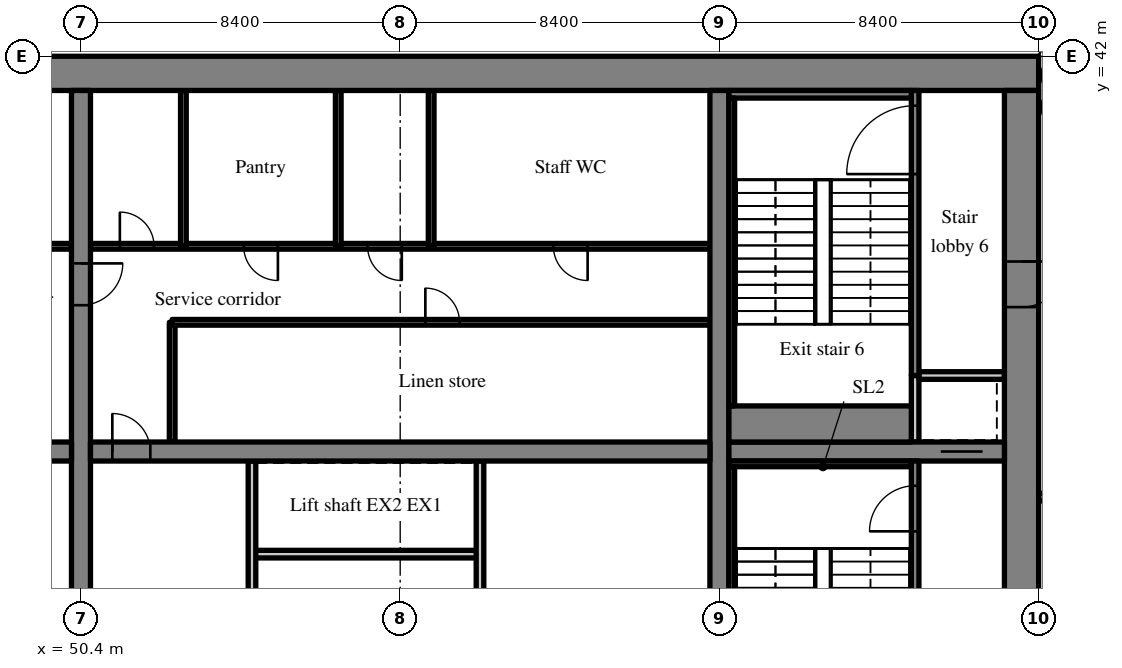
"""IFC4 building model, lengths in metres.
Left out: names, types, materials, properties, quantities, classifications, styles, units other than length and angle.
Written with IfcOpenShell. Run it as: python <this file> out.ifc"""

import sys

from ifc_helpers import new_model, si_unit, direction, frame, frame_2d, origin, place, context, subcontext, project, spatial, rectangle, extrude, source, transform, mapped, element, fill, save


model = new_model("IFC4")
c1 = context("Model", 3, precision=1e-05, world=origin(), true_north=direction((0.0, 1.0)))
c2 = subcontext(c1, "Body", "Model", "MODEL_VIEW")
j1 = project(units=[si_unit("LENGTHUNIT", "METRE"), si_unit("PLANEANGLEUNIT", "RADIAN")], contexts=[c1])
p1 = place(None, origin())
s1 = spatial("IfcSite", under=j1, at=p1, CompositionType="ELEMENT")
p2 = place(p1, origin())
s2 = spatial("IfcBuilding", under=s1, at=p2, CompositionType="ELEMENT")
p3 = place(p2, frame((0.0, 0.0, 102.8)))
s3 = spatial("IfcBuildingStorey", under=s2, at=p3, CompositionType="ELEMENT", Elevation=102.8)
m1 = source(origin(), c2, "Body", "SweptSolid", [
    extrude(rectangle(XDim=50.4, YDim=0.9, at=frame_2d((25.2, 0.0))), origin(), (0.0, 0.0, 1.0), 3.52),
])
p4 = place(p3, frame((25.2, 41.55, 0.0), z_axis=(0.0, 0.0, 1.0), x_axis=(1.0, 0.0, 0.0)))
e1 = element("IfcWall", 1, at=p4, inside=s3, PredefinedType="SHEAR", context=c2, shape_type="MappedRepresentation", body=[
    mapped(m1, transform((0.0, 0.0, 0.0), scale=1.0)),
])
m2 = source(origin(), c2, "Body", "SweptSolid", [
    extrude(rectangle(XDim=18.2, YDim=0.9, at=frame_2d((9.1, 0.0))), origin(), (0.0, 0.0, 1.0), 3.52),
])
p5 = place(p3, frame((75.15, 22.9, 0.0), z_axis=(0.0, 0.0, 1.0), x_axis=(0.0, 1.0, 0.0)))
e2 = element("IfcWall", 2, at=p5, inside=s3, PredefinedType="SHEAR", context=c2, shape_type="MappedRepresentation", body=[
    mapped(m2, transform((0.0, 0.0, 0.0), scale=1.0)),
])
m3 = source(origin(), c2, "Body", "SweptSolid", [
    extrude(rectangle(XDim=1.2, YDim=2.1, at=frame_2d((0.6, 1.05))), frame((0.0, 0.46, 0.0), z_axis=(0.0, -1.0, 0.0), x_axis=(1.0, 0.0, 0.0)), (0.0, 0.0, 1.0), 0.92),
])
p6 = place(p5, frame((12.5, 0.0, 0.0)))
e3 = element("IfcOpeningElement", 3, at=p6, cuts=e2, PredefinedType="OPENING", context=c2, shape_type="MappedRepresentation", body=[
    mapped(m3, transform((0.0, 0.0, 0.0), scale=1.0)),
])
m4 = source(origin(), c2, "Body", "SweptSolid", [
    extrude(rectangle(XDim=18.2, YDim=0.5, at=frame_2d((9.1, 0.0))), origin(), (0.0, 0.0, 1.0), 3.52),
])
p7 = place(p3, frame((50.4, 22.9, 0.0), z_axis=(0.0, 0.0, 1.0), x_axis=(0.0, 1.0, 0.0)))
e4 = element("IfcWall", 4, at=p7, inside=s3, PredefinedType="SHEAR", context=c2, shape_type="MappedRepresentation", body=[
    mapped(m4, transform((0.0, 0.0, 0.0), scale=1.0)),
])
m5 = source(origin(), c2, "Body", "SweptSolid", [
    extrude(rectangle(XDim=1.1, YDim=2.1, at=frame_2d((0.55, 1.05))), frame((0.0, 0.26, 0.0), z_axis=(0.0, -1.0, 0.0), x_axis=(1.0, 0.0, 0.0)), (0.0, 0.0, 1.0), 0.52),
])
p8 = place(p7, frame((12.55, 0.0, 0.0)))
e5 = element("IfcOpeningElement", 5, at=p8, cuts=e4, PredefinedType="OPENING", context=c2, shape_type="MappedRepresentation", body=[
    mapped(m5, transform((0.0, 0.0, 0.0), scale=1.0)),
])
p9 = place(p3, frame((67.2, 22.9, 0.0), z_axis=(0.0, 0.0, 1.0), x_axis=(0.0, 1.0, 0.0)))
e6 = element("IfcWall", 6, at=p9, inside=s3, PredefinedType="SHEAR", context=c2, shape_type="MappedRepresentation", body=[
    mapped(m4, transform((0.0, 0.0, 0.0), scale=1.0)),
])
m6 = source(origin(), c2, "Body", "SweptSolid", [
    extrude(rectangle(XDim=16.3, YDim=0.5, at=frame_2d((8.15, 0.0))), origin(), (0.0, 0.0, 1.0), 3.52),
])
p10 = place(p3, frame((33.85, 31.6, 0.0), z_axis=(0.0, 0.0, 1.0), x_axis=(1.0, 0.0, 0.0)))
e7 = element("IfcWall", 7, at=p10, inside=s3, PredefinedType="SHEAR", context=c2, shape_type="MappedRepresentation", body=[
    mapped(m6, transform((0.0, 0.0, 0.0), scale=1.0)),
])
m7 = source(origin(), c2, "Body", "SweptSolid", [
    extrude(rectangle(XDim=1.0, YDim=2.1, at=frame_2d((0.5, 1.05))), frame((0.0, 0.26, 0.0), z_axis=(0.0, -1.0, 0.0), x_axis=(1.0, 0.0, 0.0)), (0.0, 0.0, 1.0), 0.52),
])
p11 = place(p10, frame((14.725, 0.0, 0.0)))
e8 = element("IfcOpeningElement", 8, at=p11, cuts=e7, PredefinedType="OPENING", context=c2, shape_type="MappedRepresentation", body=[
    mapped(m7, transform((0.0, 0.0, 0.0), scale=1.0)),
])
m8 = source(origin(), c2, "Body", "SweptSolid", [
    extrude(rectangle(XDim=16.3, YDim=0.5, at=frame_2d((8.15, 0.0))), origin(), (0.0, 0.0, 1.0), 3.52),
])
p12 = place(p3, frame((50.65, 31.6, 0.0), z_axis=(0.0, 0.0, 1.0), x_axis=(1.0, 0.0, 0.0)))
e9 = element("IfcWall", 9, at=p12, inside=s3, PredefinedType="SHEAR", context=c2, shape_type="MappedRepresentation", body=[
    mapped(m8, transform((0.0, 0.0, 0.0), scale=1.0)),
])
p13 = place(p12, frame((0.575, 0.0, 0.0)))
e10 = element("IfcOpeningElement", 10, at=p13, cuts=e9, PredefinedType="OPENING", context=c2, shape_type="MappedRepresentation", body=[
    mapped(m7, transform((0.0, 0.0, 0.0), scale=1.0)),
])
m9 = source(origin(), c2, "Body", "SweptSolid", [
    extrude(rectangle(XDim=7.25, YDim=0.5, at=frame_2d((3.625, 0.0))), origin(), (0.0, 0.0, 1.0), 3.52),
])
p14 = place(p3, frame((67.45, 31.6, 0.0), z_axis=(0.0, 0.0, 1.0), x_axis=(1.0, 0.0, 0.0)))
e11 = element("IfcWall", 11, at=p14, inside=s3, PredefinedType="SHEAR", context=c2, shape_type="MappedRepresentation", body=[
    mapped(m9, transform((0.0, 0.0, 0.0), scale=1.0)),
])
p15 = place(p14, frame((5.575, 0.0, 0.0)))
e12 = element("IfcOpeningElement", 12, at=p15, cuts=e11, PredefinedType="OPENING", context=c2, shape_type="MappedRepresentation", body=[
    mapped(m5, transform((0.0, 0.0, 0.0), scale=1.0)),
])
m10 = source(origin(), c2, "Body", "SweptSolid", [
    extrude(rectangle(XDim=3.559, YDim=0.3, at=frame_2d((1.78, 0.0))), origin(), (0.0, 0.0, 1.0), 3.52),
])
p16 = place(p3, frame((76.523, 43.292, 0.0), z_axis=(0.0, 0.0, 1.0), x_axis=(-0.35779745313, -0.933799219604, 0.0)))
e13 = element("IfcWall", 13, at=p16, inside=s3, PredefinedType="SOLIDWALL", context=c2, shape_type="MappedRepresentation", body=[
    mapped(m10, transform((0.0, 0.0, 0.0), scale=1.0)),
])
m11 = source(origin(), c2, "Body", "SweptSolid", [
    extrude(rectangle(XDim=1.5, YDim=2.0, at=frame_2d((0.75, 1.0))), frame((0.0, 0.16, 0.0), z_axis=(0.0, -1.0, 0.0), x_axis=(1.0, 0.0, 0.0)), (0.0, 0.0, 1.0), 0.32),
])
p17 = place(p16, frame((0.156, 0.0, 0.9)))
e14 = element("IfcOpeningElement", 14, at=p17, cuts=e13, PredefinedType="OPENING", context=c2, shape_type="MappedRepresentation", body=[
    mapped(m11, transform((0.0, 0.0, 0.0), scale=1.0)),
])
m12 = source(origin(), c2, "Body", "SweptSolid", [
    extrude(rectangle(XDim=16.3, YDim=0.15, at=frame_2d((8.15, 0.0))), origin(), (0.0, 0.0, 1.0), 3.52),
])
p18 = place(p3, frame((33.85, 37.0, 0.0), z_axis=(0.0, 0.0, 1.0), x_axis=(1.0, 0.0, 0.0)))
e15 = element("IfcWall", 15, at=p18, inside=s3, PredefinedType="PARTITIONING", context=c2, shape_type="MappedRepresentation", body=[
    mapped(m12, transform((0.0, 0.0, 0.0), scale=1.0)),
])
m13 = source(origin(), c2, "Body", "SweptSolid", [
    extrude(rectangle(XDim=0.9, YDim=2.1, at=frame_2d((0.45, 1.05))), frame((0.0, 0.085, 0.0), z_axis=(0.0, -1.0, 0.0), x_axis=(1.0, 0.0, 0.0)), (0.0, 0.0, 1.0), 0.17),
])
p19 = place(p18, frame((1.588, 0.0, 0.0)))
e16 = element("IfcOpeningElement", 16, at=p19, cuts=e15, PredefinedType="OPENING", context=c2, shape_type="MappedRepresentation", body=[
    mapped(m13, transform((0.0, 0.0, 0.0), scale=1.0)),
])
p20 = place(p18, frame((7.293, 0.0, 0.0)))
e17 = element("IfcOpeningElement", 17, at=p20, cuts=e15, PredefinedType="OPENING", context=c2, shape_type="MappedRepresentation", body=[
    mapped(m13, transform((0.0, 0.0, 0.0), scale=1.0)),
])
p21 = place(p18, frame((12.183, 0.0, 0.0)))
e18 = element("IfcOpeningElement", 18, at=p21, cuts=e15, PredefinedType="OPENING", context=c2, shape_type="MappedRepresentation", body=[
    mapped(m13, transform((0.0, 0.0, 0.0), scale=1.0)),
])
p22 = place(p18, frame((14.627, 0.0, 0.0)))
e19 = element("IfcOpeningElement", 19, at=p22, cuts=e15, PredefinedType="OPENING", context=c2, shape_type="MappedRepresentation", body=[
    mapped(m13, transform((0.0, 0.0, 0.0), scale=1.0)),
])
m14 = source(origin(), c2, "Body", "SweptSolid", [
    extrude(rectangle(XDim=6.0, YDim=0.2, at=frame_2d((3.0, 0.0))), origin(), (0.0, 0.0, 1.0), 3.52),
])
p23 = place(p3, frame((60.9, 28.9, 0.0), z_axis=(0.0, 0.0, 1.0), x_axis=(-1.0, 0.0, 0.0)))
e20 = element("IfcWall", 20, at=p23, inside=s3, PredefinedType="SOLIDWALL", context=c2, shape_type="MappedRepresentation", body=[
    mapped(m14, transform((0.0, 0.0, 0.0), scale=1.0)),
])
m15 = source(origin(), c2, "Body", "SweptSolid", [
    extrude(rectangle(XDim=8.45, YDim=0.2, at=frame_2d((4.225, 0.0))), origin(), (0.0, 0.0, 1.0), 3.52),
])
for number, where, z_axis, x_axis in (
    (21, (54.9, 22.9, 0.0), (0.0, 0.0, 1.0), (0.0, 1.0, 0.0)),
    (22, (60.9, 22.9, 0.0), (0.0, 0.0, 1.0), (0.0, 1.0, 0.0)),
):
    element("IfcWall", number, at=place(p3, frame(where, z_axis=z_axis, x_axis=x_axis)), inside=s3, PredefinedType="PARTITIONING", context=c2, shape_type="MappedRepresentation", body=[
        mapped(m15, transform((0.0, 0.0, 0.0), scale=1.0)),
    ])
m16 = source(origin(), c2, "Body", "SweptSolid", [
    extrude(rectangle(XDim=3.15, YDim=0.15, at=frame_2d((1.575, 0.0))), origin(), (0.0, 0.0, 1.0), 3.52),
])
p24 = place(p3, frame((52.8, 31.85, 0.0), z_axis=(0.0, 0.0, 1.0), x_axis=(0.0, 1.0, 0.0)))
e23 = element("IfcWall", 23, at=p24, inside=s3, PredefinedType="PARTITIONING", context=c2, shape_type="MappedRepresentation", body=[
    mapped(m16, transform((0.0, 0.0, 0.0), scale=1.0)),
])
m17 = source(origin(), c2, "Body", "SweptSolid", [
    extrude(rectangle(XDim=14.15, YDim=0.15, at=frame_2d((7.075, 0.0))), origin(), (0.0, 0.0, 1.0), 3.52),
])
p25 = place(p3, frame((66.95, 35.0, 0.0), z_axis=(0.0, 0.0, 1.0), x_axis=(-1.0, 0.0, 0.0)))
e24 = element("IfcWall", 24, at=p25, inside=s3, PredefinedType="PARTITIONING", context=c2, shape_type="MappedRepresentation", body=[
    mapped(m17, transform((0.0, 0.0, 0.0), scale=1.0)),
])
p26 = place(p25, frame((6.588, 0.0, 0.0)))
e25 = element("IfcOpeningElement", 25, at=p26, cuts=e24, PredefinedType="OPENING", context=c2, shape_type="MappedRepresentation", body=[
    mapped(m13, transform((0.0, 0.0, 0.0), scale=1.0)),
])
m18 = source(origin(), c2, "Body", "SweptSolid", [
    extrude(rectangle(XDim=16.3, YDim=0.15, at=frame_2d((8.15, 0.0))), origin(), (0.0, 0.0, 1.0), 3.52),
])
p27 = place(p3, frame((66.95, 37.0, 0.0), z_axis=(0.0, 0.0, 1.0), x_axis=(-1.0, 0.0, 0.0)))
e26 = element("IfcWall", 26, at=p27, inside=s3, PredefinedType="PARTITIONING", context=c2, shape_type="MappedRepresentation", body=[
    mapped(m18, transform((0.0, 0.0, 0.0), scale=1.0)),
])
p28 = place(p27, frame((3.218, 0.0, 0.0)))
e27 = element("IfcOpeningElement", 27, at=p28, cuts=e26, PredefinedType="OPENING", context=c2, shape_type="MappedRepresentation", body=[
    mapped(m13, transform((0.0, 0.0, 0.0), scale=1.0)),
])
p29 = place(p27, frame((8.108, 0.0, 0.0)))
e28 = element("IfcOpeningElement", 28, at=p29, cuts=e26, PredefinedType="OPENING", context=c2, shape_type="MappedRepresentation", body=[
    mapped(m13, transform((0.0, 0.0, 0.0), scale=1.0)),
])
p30 = place(p27, frame((11.368, 0.0, 0.0)))
e29 = element("IfcOpeningElement", 29, at=p30, cuts=e26, PredefinedType="OPENING", context=c2, shape_type="MappedRepresentation", body=[
    mapped(m13, transform((0.0, 0.0, 0.0), scale=1.0)),
])
p31 = place(p27, frame((14.627, 0.0, 0.0)))
e30 = element("IfcOpeningElement", 30, at=p31, cuts=e26, PredefinedType="OPENING", context=c2, shape_type="MappedRepresentation", body=[
    mapped(m13, transform((0.0, 0.0, 0.0), scale=1.0)),
])
m19 = source(origin(), c2, "Body", "SweptSolid", [
    extrude(rectangle(XDim=4.1, YDim=0.15, at=frame_2d((2.05, 0.0))), origin(), (0.0, 0.0, 1.0), 3.52),
])
for number, where, z_axis, x_axis in (
    (31, (59.615, 37.0, 0.0), (0.0, 0.0, 1.0), (0.0, 1.0, 0.0)),
    (32, (57.17, 37.0, 0.0), (0.0, 0.0, 1.0), (0.0, 1.0, 0.0)),
    (33, (53.095, 37.0, 0.0), (0.0, 0.0, 1.0), (0.0, 1.0, 0.0)),
):
    element("IfcWall", number, at=place(p3, frame(where, z_axis=z_axis, x_axis=x_axis)), inside=s3, PredefinedType="PARTITIONING", context=c2, shape_type="MappedRepresentation", body=[
        mapped(m19, transform((0.0, 0.0, 0.0), scale=1.0)),
    ])
m20 = source(origin(), c2, "Body", "SweptSolid", [
    extrude(rectangle(XDim=8.45, YDim=0.2, at=frame_2d((4.225, 0.0))), origin(), (0.0, 0.0, 1.0), 3.52),
])
p32 = place(p3, frame((72.35, 22.9, 0.0), z_axis=(0.0, 0.0, 1.0), x_axis=(0.0, 1.0, 0.0)))
e34 = element("IfcWall", 34, at=p32, inside=s3, PredefinedType="SOLIDWALL", context=c2, shape_type="MappedRepresentation", body=[
    mapped(m20, transform((0.0, 0.0, 0.0), scale=1.0)),
])
m21 = source(origin(), c2, "Body", "SweptSolid", [
    extrude(rectangle(XDim=1.2, YDim=2.1, at=frame_2d((0.6, 1.05))), frame((0.0, 0.11, 0.0), z_axis=(0.0, -1.0, 0.0), x_axis=(1.0, 0.0, 0.0)), (0.0, 0.0, 1.0), 0.22),
])
p33 = place(p32, frame((6.6, 0.0, 0.0)))
e35 = element("IfcOpeningElement", 35, at=p33, cuts=e34, PredefinedType="OPENING", context=c2, shape_type="MappedRepresentation", body=[
    mapped(m21, transform((0.0, 0.0, 0.0), scale=1.0)),
])
m22 = source(origin(), c2, "Body", "SweptSolid", [
    extrude(rectangle(XDim=1.75, YDim=0.2, at=frame_2d((0.875, 0.0))), origin(), (0.0, 0.0, 1.0), 3.52),
])
p34 = place(p3, frame((72.35, 31.85, 0.0), z_axis=(0.0, 0.0, 1.0), x_axis=(0.0, 1.0, 0.0)))
e36 = element("IfcWall", 36, at=p34, inside=s3, PredefinedType="SOLIDWALL", context=c2, shape_type="MappedRepresentation", body=[
    mapped(m22, transform((0.0, 0.0, 0.0), scale=1.0)),
])
m23 = source(origin(), c2, "Body", "SweptSolid", [
    extrude(rectangle(XDim=2.25, YDim=0.2, at=frame_2d((1.125, 0.0))), origin(), (0.0, 0.0, 1.0), 3.52),
])
p35 = place(p3, frame((72.45, 33.6, 0.0), z_axis=(0.0, 0.0, 1.0), x_axis=(1.0, 0.0, 0.0)))
e37 = element("IfcWall", 37, at=p35, inside=s3, PredefinedType="SOLIDWALL", context=c2, shape_type="MappedRepresentation", body=[
    mapped(m23, transform((0.0, 0.0, 0.0), scale=1.0)),
])
m24 = source(origin(), c2, "Body", "SweptSolid", [
    extrude(rectangle(XDim=7.5, YDim=0.2, at=frame_2d((3.75, 0.0))), origin(), (0.0, 0.0, 1.0), 3.52),
])
p36 = place(p3, frame((72.35, 33.6, 0.0), z_axis=(0.0, 0.0, 1.0), x_axis=(0.0, 1.0, 0.0)))
e38 = element("IfcWall", 38, at=p36, inside=s3, PredefinedType="SOLIDWALL", context=c2, shape_type="MappedRepresentation", body=[
    mapped(m24, transform((0.0, 0.0, 0.0), scale=1.0)),
])
m25 = source(origin(), c2, "Body", "SweptSolid", [
    extrude(rectangle(XDim=1.8, YDim=2.1, at=frame_2d((0.9, 1.05))), frame((0.0, 0.11, 0.0), z_axis=(0.0, -1.0, 0.0), x_axis=(1.0, 0.0, 0.0)), (0.0, 0.0, 1.0), 0.22),
])
p37 = place(p36, frame((5.3, 0.0, 0.0)))
e39 = element("IfcOpeningElement", 39, at=p37, cuts=e38, PredefinedType="OPENING", context=c2, shape_type="MappedRepresentation", body=[
    mapped(m25, transform((0.0, 0.0, 0.0), scale=1.0)),
])
m26 = source(origin(), c2, "Body", "SweptSolid", [
    extrude(rectangle(XDim=8.225, YDim=0.2, at=frame_2d((4.112, 0.0))), origin(), (0.0, 0.0, 1.0), 3.52),
])
p38 = place(p3, frame((83.825, 30.4, 0.0), z_axis=(0.0, 0.0, 1.0), x_axis=(-1.0, 0.0, 0.0)))
e40 = element("IfcWall", 40, at=p38, inside=s3, PredefinedType="SOLIDWALL", context=c2, shape_type="MappedRepresentation", body=[
    mapped(m26, transform((0.0, 0.0, 0.0), scale=1.0)),
])
m27 = source(origin(), c2, "Body", "SweptSolid", [
    extrude(rectangle(XDim=1.0, YDim=2.1, at=frame_2d((0.5, 1.05))), frame((0.0, 0.11, 0.0), z_axis=(0.0, -1.0, 0.0), x_axis=(1.0, 0.0, 0.0)), (0.0, 0.0, 1.0), 0.22),
])
p39 = place(p38, frame((6.125, 0.0, 0.0)))
e41 = element("IfcOpeningElement", 41, at=p39, cuts=e40, PredefinedType="OPENING", context=c2, shape_type="MappedRepresentation", body=[
    mapped(m27, transform((0.0, 0.0, 0.0), scale=1.0)),
])
m28 = source(origin(), c2, "Body", "SweptSolid", [
    extrude(rectangle(XDim=4.8, YDim=0.15, at=frame_2d((2.4, 0.0))), origin(), (0.0, 0.0, 1.0), 3.52),
])
p40 = place(p3, frame((67.45, 31.275, 0.0), z_axis=(0.0, 0.0, 1.0), x_axis=(1.0, 0.0, 0.0)))
e42 = element("IfcWall", 42, at=p40, inside=s3, PredefinedType="SOLIDWALL", context=c2, shape_type="MappedRepresentation", body=[
    mapped(m28, transform((0.0, 0.0, 0.0), scale=1.0)),
])
m29 = source(origin(), c2, "Body", "SweptSolid", [
    extrude(rectangle(XDim=8.1, YDim=0.15, at=frame_2d((4.05, 0.0))), origin(), (0.0, 0.0, 1.0), 3.52),
])
p41 = place(p3, frame((67.525, 23.1, 0.0), z_axis=(0.0, 0.0, 1.0), x_axis=(0.0, 1.0, 0.0)))
e43 = element("IfcWall", 43, at=p41, inside=s3, PredefinedType="SOLIDWALL", context=c2, shape_type="MappedRepresentation", body=[
    mapped(m29, transform((0.0, 0.0, 0.0), scale=1.0)),
])
m30 = source(origin(), c2, "Body", "SweptSolid", [
    extrude(rectangle(XDim=4.8, YDim=0.2, at=frame_2d((2.4, 0.0))), origin(), (0.0, 0.0, 1.0), 3.52),
])
p42 = place(p3, frame((67.45, 41.0, 0.0), z_axis=(0.0, 0.0, 1.0), x_axis=(1.0, 0.0, 0.0)))
e44 = element("IfcWall", 44, at=p42, inside=s3, PredefinedType="SOLIDWALL", context=c2, shape_type="MappedRepresentation", body=[
    mapped(m30, transform((0.0, 0.0, 0.0), scale=1.0)),
])
m31 = source(origin(), c2, "Body", "SweptSolid", [
    extrude(rectangle(XDim=4.8, YDim=0.95, at=frame_2d((2.4, 0.0))), origin(), (0.0, 0.0, 1.0), 3.52),
])
p43 = place(p3, frame((67.45, 32.325, 0.0), z_axis=(0.0, 0.0, 1.0), x_axis=(1.0, 0.0, 0.0)))
e45 = element("IfcWall", 45, at=p43, inside=s3, PredefinedType="SOLIDWALL", context=c2, shape_type="MappedRepresentation", body=[
    mapped(m31, transform((0.0, 0.0, 0.0), scale=1.0)),
])
p44 = place(p3, frame((67.525, 32.8, 0.0), z_axis=(0.0, 0.0, 1.0), x_axis=(0.0, 1.0, 0.0)))
e46 = element("IfcWall", 46, at=p44, inside=s3, PredefinedType="SOLIDWALL", context=c2, shape_type="MappedRepresentation", body=[
    mapped(m29, transform((0.0, 0.0, 0.0), scale=1.0)),
])
m32 = source(origin(), c2, "Body", "SweptSolid", [
    extrude(rectangle(XDim=1.0, YDim=2.1, at=frame_2d((0.5, 1.05))), frame((0.0, 0.025, 0.0), z_axis=(0.0, -1.0, 0.0), x_axis=(1.0, 0.0, 0.0)), (0.0, 0.0, 1.0), 0.05),
])
p45 = place(p13, origin())
e47 = element("IfcDoor", 47, at=p45, inside=s3, OperationType="SINGLE_SWING_LEFT", PredefinedType="DOOR", context=c2, shape_type="MappedRepresentation", body=[
    mapped(m32, transform((0.0, 0.0, 0.0), scale=1.0)),
])
fill(e10, e47)
m33 = source(origin(), c2, "Body", "SweptSolid", [
    extrude(rectangle(XDim=0.9, YDim=2.1, at=frame_2d((0.45, 1.05))), frame((0.0, 0.025, 0.0), z_axis=(0.0, -1.0, 0.0), x_axis=(1.0, 0.0, 0.0)), (0.0, 0.0, 1.0), 0.05),
])
p46 = place(p26, origin())
e48 = element("IfcDoor", 48, at=p46, inside=s3, OperationType="SINGLE_SWING_RIGHT", PredefinedType="DOOR", context=c2, shape_type="MappedRepresentation", body=[
    mapped(m33, transform((0.0, 0.0, 0.0), scale=1.0)),
])
fill(e25, e48)
p47 = place(p28, origin())
e49 = element("IfcDoor", 49, at=p47, inside=s3, OperationType="SINGLE_SWING_LEFT", PredefinedType="DOOR", context=c2, shape_type="MappedRepresentation", body=[
    mapped(m33, transform((0.0, 0.0, 0.0), scale=1.0)),
])
fill(e27, e49)
p48 = place(p29, origin())
e50 = element("IfcDoor", 50, at=p48, inside=s3, OperationType="SINGLE_SWING_LEFT", PredefinedType="DOOR", context=c2, shape_type="MappedRepresentation", body=[
    mapped(m33, transform((0.0, 0.0, 0.0), scale=1.0)),
])
fill(e28, e50)
p49 = place(p30, origin())
e51 = element("IfcDoor", 51, at=p49, inside=s3, OperationType="SINGLE_SWING_LEFT", PredefinedType="DOOR", context=c2, shape_type="MappedRepresentation", body=[
    mapped(m33, transform((0.0, 0.0, 0.0), scale=1.0)),
])
fill(e29, e51)
p50 = place(p31, origin())
e52 = element("IfcDoor", 52, at=p50, inside=s3, OperationType="SINGLE_SWING_RIGHT", PredefinedType="DOOR", context=c2, shape_type="MappedRepresentation", body=[
    mapped(m33, transform((0.0, 0.0, 0.0), scale=1.0)),
])
fill(e30, e52)
m34 = source(origin(), c2, "Body", "SweptSolid", [
    extrude(rectangle(XDim=1.2, YDim=2.1, at=frame_2d((0.6, 1.05))), frame((0.0, 0.025, 0.0), z_axis=(0.0, -1.0, 0.0), x_axis=(1.0, 0.0, 0.0)), (0.0, 0.0, 1.0), 0.05),
])
p51 = place(p33, origin())
e53 = element("IfcDoor", 53, at=p51, inside=s3, OperationType="SINGLE_SWING_LEFT", PredefinedType="DOOR", context=c2, shape_type="MappedRepresentation", body=[
    mapped(m34, transform((0.0, 0.0, 0.0), scale=1.0)),
])
fill(e35, e53)
m35 = source(origin(), c2, "Body", "SweptSolid", [
    extrude(rectangle(XDim=1.1, YDim=2.1, at=frame_2d((0.55, 1.05))), frame((0.0, 0.025, 0.0), z_axis=(0.0, -1.0, 0.0), x_axis=(1.0, 0.0, 0.0)), (0.0, 0.0, 1.0), 0.05),
])
p52 = place(p15, origin())
e54 = element("IfcDoor", 54, at=p52, inside=s3, OperationType="SLIDING_TO_RIGHT", PredefinedType="DOOR", context=c2, shape_type="MappedRepresentation", body=[
    mapped(m35, transform((0.0, 0.0, 0.0), scale=1.0)),
])
fill(e12, e54)
m36 = source(origin(), c2, "Body", "SweptSolid", [
    extrude(rectangle(XDim=1.8, YDim=2.1, at=frame_2d((0.9, 1.05))), frame((0.0, 0.025, 0.0), z_axis=(0.0, -1.0, 0.0), x_axis=(1.0, 0.0, 0.0)), (0.0, 0.0, 1.0), 0.05),
])
p53 = place(p37, origin())
e55 = element("IfcDoor", 55, at=p53, inside=s3, OperationType="SINGLE_SWING_LEFT", PredefinedType="DOOR", context=c2, shape_type="MappedRepresentation", body=[
    mapped(m36, transform((0.0, 0.0, 0.0), scale=1.0)),
])
fill(e39, e55)
p54 = place(p6, origin())
e56 = element("IfcDoor", 56, at=p54, inside=s3, OperationType="SINGLE_SWING_RIGHT", PredefinedType="DOOR", context=c2, shape_type="MappedRepresentation", body=[
    mapped(m34, transform((0.0, 0.0, 0.0), scale=1.0)),
])
fill(e3, e56)
p55 = place(p8, origin())
e57 = element("IfcDoor", 57, at=p55, inside=s3, OperationType="SINGLE_SWING_RIGHT", PredefinedType="DOOR", context=c2, shape_type="MappedRepresentation", body=[
    mapped(m35, transform((0.0, 0.0, 0.0), scale=1.0)),
])
fill(e5, e57)
save(model, sys.argv[1])
